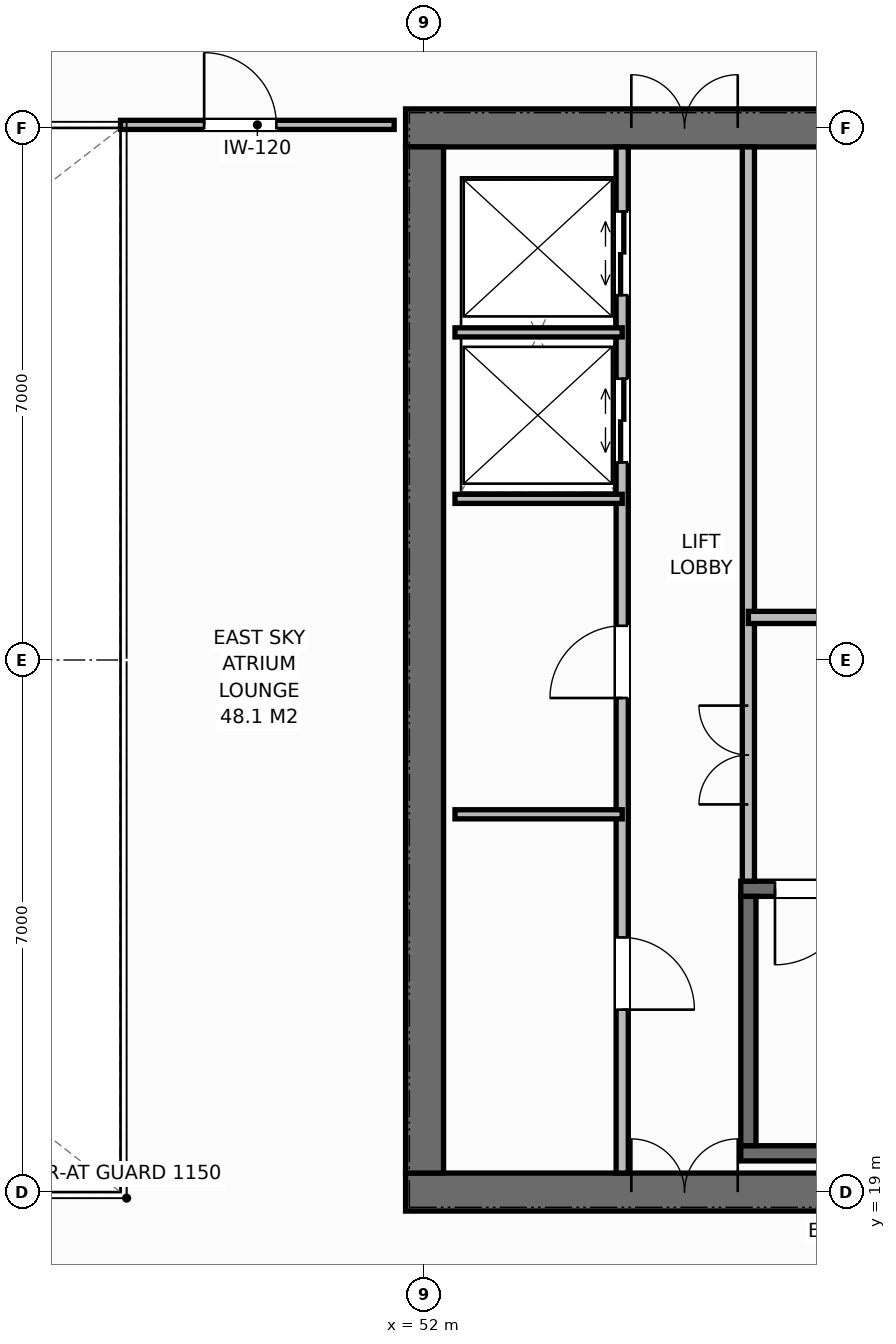
"""IFC4 building model, lengths in metres.
Left out: names, types, materials, properties, quantities, classifications, styles, units other than length and angle.
Written with IfcOpenShell. Run it as: python <this file> out.ifc"""

import sys

from ifc_helpers import new_model, si_unit, direction, frame, frame_2d, origin, place, context, subcontext, project, spatial, rectangle, extrude, element, fill, save


model = new_model("IFC4")
c1 = context("Model", 3, precision=1e-05, world=origin(), true_north=direction((0.0, 1.0)))
c2 = subcontext(c1, "Body", "Model", "MODEL_VIEW")
j1 = project(units=[si_unit("LENGTHUNIT", "METRE"), si_unit("PLANEANGLEUNIT", "RADIAN")], contexts=[c1])
p1 = place(None, origin())
s1 = spatial("IfcSite", under=j1, at=p1, CompositionType="ELEMENT")
p2 = place(p1, origin())
s2 = spatial("IfcBuilding", under=s1, at=p2, CompositionType="ELEMENT")
p3 = place(p2, frame((0.0, 0.0, 294.4)))
s3 = spatial("IfcBuildingStorey", under=s2, at=p3, CompositionType="ELEMENT", Elevation=294.4)
p4 = place(p3, frame((51.75, 19.0, 0.0), z_axis=(0.0, 0.0, 1.0), x_axis=(1.0, 0.0, 0.0)))
e1 = element("IfcWall", 1, at=p4, inside=s3, PredefinedType="SHEAR", context=c2, shape_type="SweptSolid", body=[
    extrude(rectangle(XDim=13.5, YDim=0.5, at=frame_2d((6.75, 0.0))), origin(), (0.0, 0.0, 1.0), 4.0),
])
p5 = place(p4, frame((2.97, 0.0, 0.0)))
e2 = element("IfcOpeningElement", 2, at=p5, cuts=e1, PredefinedType="OPENING", context=c2, shape_type="SweptSolid", body=[
    extrude(rectangle(XDim=1.4, YDim=2.2, at=frame_2d((0.7, 1.1))), frame((0.0, 0.26, 0.0), z_axis=(0.0, -1.0, 0.0), x_axis=(1.0, 0.0, 0.0)), (0.0, 0.0, 1.0), 0.52),
])
p6 = place(p3, frame((51.75, 33.0, 0.0), z_axis=(0.0, 0.0, 1.0), x_axis=(1.0, 0.0, 0.0)))
e3 = element("IfcWall", 3, at=p6, inside=s3, PredefinedType="SHEAR", context=c2, shape_type="SweptSolid", body=[
    extrude(rectangle(XDim=13.5, YDim=0.5, at=frame_2d((6.75, 0.0))), origin(), (0.0, 0.0, 1.0), 4.0),
])
p7 = place(p6, frame((2.97, 0.0, 0.0)))
e4 = element("IfcOpeningElement", 4, at=p7, cuts=e3, PredefinedType="OPENING", context=c2, shape_type="SweptSolid", body=[
    extrude(rectangle(XDim=1.4, YDim=2.2, at=frame_2d((0.7, 1.1))), frame((0.0, 0.26, 0.0), z_axis=(0.0, -1.0, 0.0), x_axis=(1.0, 0.0, 0.0)), (0.0, 0.0, 1.0), 0.52),
])
p8 = place(p6, frame((10.85, 0.0, 0.0)))
e5 = element("IfcOpeningElement", 5, at=p8, cuts=e3, PredefinedType="OPENING", context=c2, shape_type="SweptSolid", body=[
    extrude(rectangle(XDim=0.9, YDim=2.15, at=frame_2d((0.45, 1.075))), frame((0.0, 0.26, 0.0), z_axis=(0.0, -1.0, 0.0), x_axis=(1.0, 0.0, 0.0)), (0.0, 0.0, 1.0), 0.52),
])
p9 = place(p6, frame((6.25, 0.0, 0.0)))
e6 = element("IfcOpeningElement", 6, at=p9, cuts=e3, PredefinedType="OPENING", context=c2, shape_type="SweptSolid", body=[
    extrude(rectangle(XDim=0.95, YDim=2.15, at=frame_2d((0.475, 1.075))), frame((0.0, 0.26, 0.0), z_axis=(0.0, -1.0, 0.0), x_axis=(1.0, 0.0, 0.0)), (0.0, 0.0, 1.0), 0.52),
])
p10 = place(p6, frame((8.7, 0.0, 0.0)))
e7 = element("IfcOpeningElement", 7, at=p10, cuts=e3, PredefinedType="OPENING", context=c2, shape_type="SweptSolid", body=[
    extrude(rectangle(XDim=0.9, YDim=2.15, at=frame_2d((0.45, 1.075))), frame((0.0, 0.26, 0.0), z_axis=(0.0, -1.0, 0.0), x_axis=(1.0, 0.0, 0.0)), (0.0, 0.0, 1.0), 0.52),
])
p11 = place(p3, frame((52.0, 19.25, 0.0), z_axis=(0.0, 0.0, 1.0), x_axis=(0.0, 1.0, 0.0)))
e8 = element("IfcWall", 8, at=p11, inside=s3, PredefinedType="SHEAR", context=c2, shape_type="SweptSolid", body=[
    extrude(rectangle(XDim=13.5, YDim=0.5, at=frame_2d((6.75, 0.0))), origin(), (0.0, 0.0, 1.0), 4.0),
])
p12 = place(p3, frame((56.16, 19.51, 0.0), z_axis=(0.0, 0.0, 1.0), x_axis=(1.0, 0.0, 0.0)))
e9 = element("IfcWall", 9, at=p12, inside=s3, PredefinedType="SHEAR", context=c2, shape_type="SweptSolid", body=[
    extrude(rectangle(XDim=8.43, YDim=0.2, at=frame_2d((4.215, 0.0))), origin(), (0.0, 0.0, 1.0), 4.0),
])
p13 = place(p3, frame((56.16, 22.99, 0.0), z_axis=(0.0, 0.0, 1.0), x_axis=(1.0, 0.0, 0.0)))
e10 = element("IfcWall", 10, at=p13, inside=s3, PredefinedType="SHEAR", context=c2, shape_type="SweptSolid", body=[
    extrude(rectangle(XDim=8.43, YDim=0.2, at=frame_2d((4.215, 0.0))), origin(), (0.0, 0.0, 1.0), 4.0),
])
p14 = place(p13, frame((0.45, 0.0, 0.0)))
e11 = element("IfcOpeningElement", 11, at=p14, cuts=e10, PredefinedType="OPENING", context=c2, shape_type="SweptSolid", body=[
    extrude(rectangle(XDim=1.0, YDim=2.15, at=frame_2d((0.5, 1.075))), frame((0.0, 0.11, 0.0), z_axis=(0.0, -1.0, 0.0), x_axis=(1.0, 0.0, 0.0)), (0.0, 0.0, 1.0), 0.22),
])
p15 = place(p3, frame((56.26, 19.61, 0.0), z_axis=(0.0, 0.0, 1.0), x_axis=(0.0, 1.0, 0.0)))
e12 = element("IfcWall", 12, at=p15, inside=s3, PredefinedType="SHEAR", context=c2, shape_type="SweptSolid", body=[
    extrude(rectangle(XDim=3.28, YDim=0.2, at=frame_2d((1.64, 0.0))), origin(), (0.0, 0.0, 1.0), 4.0),
])
p16 = place(p3, frame((54.6, 19.25, 0.0), z_axis=(0.0, 0.0, 1.0), x_axis=(0.0, 1.0, 0.0)))
e13 = element("IfcWall", 13, at=p16, inside=s3, PredefinedType="STANDARD", context=c2, shape_type="SweptSolid", body=[
    extrude(rectangle(XDim=13.5, YDim=0.16, at=frame_2d((6.75, 0.0))), origin(), (0.0, 0.0, 1.0), 3.788),
])
p17 = place(p16, frame((2.15, 0.0, 0.0)))
e14 = element("IfcOpeningElement", 14, at=p17, cuts=e13, PredefinedType="OPENING", context=c2, shape_type="SweptSolid", body=[
    extrude(rectangle(XDim=0.95, YDim=2.15, at=frame_2d((0.475, 1.075))), frame((0.0, 0.09, 0.0), z_axis=(0.0, -1.0, 0.0), x_axis=(1.0, 0.0, 0.0)), (0.0, 0.0, 1.0), 0.18),
])
p18 = place(p16, frame((6.25, 0.0, 0.0)))
e15 = element("IfcOpeningElement", 15, at=p18, cuts=e13, PredefinedType="OPENING", context=c2, shape_type="SweptSolid", body=[
    extrude(rectangle(XDim=0.95, YDim=2.15, at=frame_2d((0.475, 1.075))), frame((0.0, 0.09, 0.0), z_axis=(0.0, -1.0, 0.0), x_axis=(1.0, 0.0, 0.0)), (0.0, 0.0, 1.0), 0.18),
])
p19 = place(p16, frame((9.35, 0.0, 0.0)))
e16 = element("IfcOpeningElement", 16, at=p19, cuts=e13, PredefinedType="OPENING", context=c2, shape_type="SweptSolid", body=[
    extrude(rectangle(XDim=1.1, YDim=2.2, at=frame_2d((0.55, 1.1))), frame((0.0, 0.09, 0.0), z_axis=(0.0, -1.0, 0.0), x_axis=(1.0, 0.0, 0.0)), (0.0, 0.0, 1.0), 0.18),
])
p20 = place(p16, frame((11.55, 0.0, 0.0)))
e17 = element("IfcOpeningElement", 17, at=p20, cuts=e13, PredefinedType="OPENING", context=c2, shape_type="SweptSolid", body=[
    extrude(rectangle(XDim=1.1, YDim=2.2, at=frame_2d((0.55, 1.1))), frame((0.0, 0.09, 0.0), z_axis=(0.0, -1.0, 0.0), x_axis=(1.0, 0.0, 0.0)), (0.0, 0.0, 1.0), 0.18),
])
p21 = place(p3, frame((56.26, 23.09, 0.0), z_axis=(0.0, 0.0, 1.0), x_axis=(0.0, 1.0, 0.0)))
e18 = element("IfcWall", 18, at=p21, inside=s3, PredefinedType="STANDARD", context=c2, shape_type="SweptSolid", body=[
    extrude(rectangle(XDim=9.66, YDim=0.16, at=frame_2d((4.83, 0.0))), origin(), (0.0, 0.0, 1.0), 3.788),
])
p22 = place(p21, frame((1.01, 0.0, 0.0)))
e19 = element("IfcOpeningElement", 19, at=p22, cuts=e18, PredefinedType="OPENING", context=c2, shape_type="SweptSolid", body=[
    extrude(rectangle(XDim=1.3, YDim=2.2, at=frame_2d((0.65, 1.1))), frame((0.0, 0.09, 0.0), z_axis=(0.0, -1.0, 0.0), x_axis=(1.0, 0.0, 0.0)), (0.0, 0.0, 1.0), 0.18),
])
for number, where, z_axis, x_axis in (
    (20, (52.4, 23.97, 0.0), (0.0, 0.0, 1.0), (1.0, 0.0, 0.0)),
    (21, (52.4, 28.12, 0.0), (0.0, 0.0, 1.0), (1.0, 0.0, 0.0)),
    (22, (52.4, 30.31, 0.0), (0.0, 0.0, 1.0), (1.0, 0.0, 0.0)),
):
    element("IfcWall", number, at=place(p3, frame(where, z_axis=z_axis, x_axis=x_axis)), inside=s3, PredefinedType="PARTITIONING", context=c2, shape_type="SweptSolid", body=[
        extrude(rectangle(XDim=2.2, YDim=0.12, at=frame_2d((1.1, 0.0))), origin(), (0.0, 0.0, 1.0), 3.788),
    ])
p23 = place(p3, frame((56.26, 26.56, 0.0), z_axis=(0.0, 0.0, 1.0), x_axis=(1.0, 0.0, 0.0)))
e23 = element("IfcWall", 23, at=p23, inside=s3, PredefinedType="STANDARD", context=c2, shape_type="SweptSolid", body=[
    extrude(rectangle(XDim=8.34, YDim=0.16, at=frame_2d((4.17, 0.0))), origin(), (0.0, 0.0, 1.0), 3.788),
])
p24 = place(p3, frame((48.0, 33.04, 0.0), z_axis=(0.0, 0.0, 1.0), x_axis=(1.0, 0.0, 0.0)))
e24 = element("IfcWall", 24, at=p24, inside=s3, PredefinedType="PARTITIONING", context=c2, shape_type="SweptSolid", body=[
    extrude(rectangle(XDim=3.6, YDim=0.12, at=frame_2d((1.8, 0.0))), origin(), (0.0, 0.0, 1.0), 3.528),
])
p25 = place(p24, frame((1.1, 0.0, 0.0)))
e25 = element("IfcOpeningElement", 25, at=p25, cuts=e24, PredefinedType="OPENING", context=c2, shape_type="SweptSolid", body=[
    extrude(rectangle(XDim=0.95, YDim=2.15, at=frame_2d((0.475, 1.075))), frame((0.0, 0.07, 0.0), z_axis=(0.0, -1.0, 0.0), x_axis=(1.0, 0.0, 0.0)), (0.0, 0.0, 1.0), 0.14),
])
p26 = place(p5, origin())
e26 = element("IfcDoor", 26, at=p26, inside=s3, OperationType="DOUBLE_DOOR_SINGLE_SWING", PredefinedType="DOOR", context=c2, shape_type="SweptSolid", body=[
    extrude(rectangle(XDim=1.4, YDim=2.2, at=frame_2d((0.7, 1.1))), frame((0.0, 0.075, 0.0), z_axis=(0.0, -1.0, 0.0), x_axis=(1.0, 0.0, 0.0)), (0.0, 0.0, 1.0), 0.05),
])
fill(e2, e26)
p27 = place(p7, origin())
e27 = element("IfcDoor", 27, at=p27, inside=s3, OperationType="DOUBLE_DOOR_SINGLE_SWING", PredefinedType="DOOR", context=c2, shape_type="SweptSolid", body=[
    extrude(rectangle(XDim=1.4, YDim=2.2, at=frame_2d((0.7, 1.1))), frame((0.0, -0.025, 0.0), z_axis=(0.0, -1.0, 0.0), x_axis=(1.0, 0.0, 0.0)), (0.0, 0.0, 1.0), 0.05),
])
fill(e4, e27)
p28 = place(p17, origin())
e28 = element("IfcDoor", 28, at=p28, inside=s3, OperationType="SINGLE_SWING_RIGHT", PredefinedType="DOOR", context=c2, shape_type="SweptSolid", body=[
    extrude(rectangle(XDim=0.95, YDim=2.15, at=frame_2d((0.475, 1.075))), frame((0.0, 0.025, 0.0), z_axis=(0.0, -1.0, 0.0), x_axis=(1.0, 0.0, 0.0)), (0.0, 0.0, 1.0), 0.05),
])
fill(e14, e28)
p29 = place(p18, origin())
e29 = element("IfcDoor", 29, at=p29, inside=s3, OperationType="SINGLE_SWING_LEFT", PredefinedType="DOOR", context=c2, shape_type="SweptSolid", body=[
    extrude(rectangle(XDim=0.95, YDim=2.15, at=frame_2d((0.475, 1.075))), frame((0.0, 0.025, 0.0), z_axis=(0.0, -1.0, 0.0), x_axis=(1.0, 0.0, 0.0)), (0.0, 0.0, 1.0), 0.05),
])
fill(e15, e29)
p30 = place(p19, origin())
e30 = element("IfcDoor", 30, at=p30, inside=s3, OperationType="DOUBLE_DOOR_SLIDING", PredefinedType="DOOR", context=c2, shape_type="SweptSolid", body=[
    extrude(rectangle(XDim=1.1, YDim=2.2, at=frame_2d((0.55, 1.1))), frame((0.0, 0.025, 0.0), z_axis=(0.0, -1.0, 0.0), x_axis=(1.0, 0.0, 0.0)), (0.0, 0.0, 1.0), 0.05),
])
fill(e16, e30)
p31 = place(p20, origin())
e31 = element("IfcDoor", 31, at=p31, inside=s3, OperationType="DOUBLE_DOOR_SLIDING", PredefinedType="DOOR", context=c2, shape_type="SweptSolid", body=[
    extrude(rectangle(XDim=1.1, YDim=2.2, at=frame_2d((0.55, 1.1))), frame((0.0, 0.025, 0.0), z_axis=(0.0, -1.0, 0.0), x_axis=(1.0, 0.0, 0.0)), (0.0, 0.0, 1.0), 0.05),
])
fill(e17, e31)
p32 = place(p14, origin())
e32 = element("IfcDoor", 32, at=p32, inside=s3, OperationType="SINGLE_SWING_RIGHT", PredefinedType="DOOR", context=c2, shape_type="SweptSolid", body=[
    extrude(rectangle(XDim=1.0, YDim=2.15, at=frame_2d((0.5, 1.075))), frame((0.0, 0.025, 0.0), z_axis=(0.0, -1.0, 0.0), x_axis=(1.0, 0.0, 0.0)), (0.0, 0.0, 1.0), 0.05),
])
fill(e11, e32)
p33 = place(p22, origin())
e33 = element("IfcDoor", 33, at=p33, inside=s3, OperationType="DOUBLE_DOOR_SINGLE_SWING", PredefinedType="DOOR", context=c2, shape_type="SweptSolid", body=[
    extrude(rectangle(XDim=1.3, YDim=2.2, at=frame_2d((0.65, 1.1))), frame((0.0, 0.025, 0.0), z_axis=(0.0, -1.0, 0.0), x_axis=(1.0, 0.0, 0.0)), (0.0, 0.0, 1.0), 0.05),
])
fill(e19, e33)
p34 = place(p25, origin())
e34 = element("IfcDoor", 34, at=p34, inside=s3, OperationType="SINGLE_SWING_LEFT", PredefinedType="DOOR", context=c2, shape_type="SweptSolid", body=[
    extrude(rectangle(XDim=0.95, YDim=2.15, at=frame_2d((0.475, 1.075))), frame((0.0, 0.025, 0.0), z_axis=(0.0, -1.0, 0.0), x_axis=(1.0, 0.0, 0.0)), (0.0, 0.0, 1.0), 0.05),
])
fill(e25, e34)
save(model, sys.argv[1])
